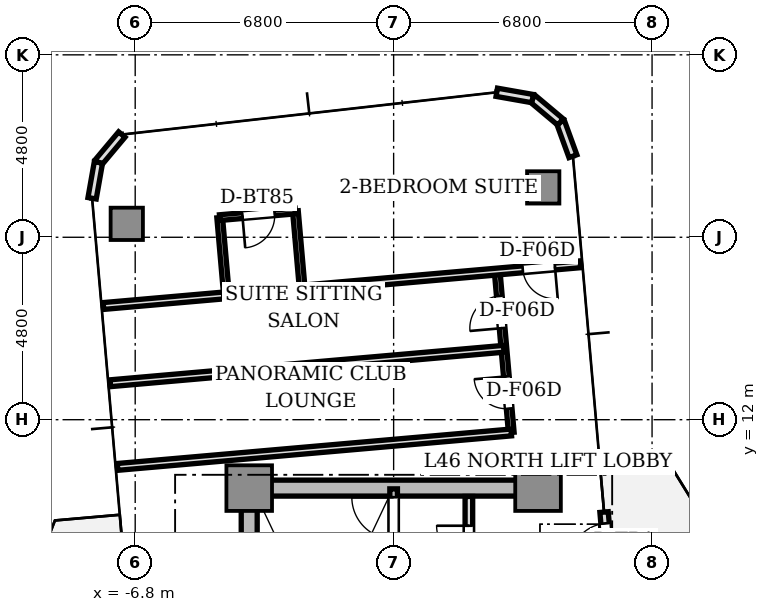
"""IFC4 building model, lengths in metres.
Left out: names, types, materials, properties, quantities, classifications, styles, units other than length and angle.
Written with IfcOpenShell. Run it as: python <this file> out.ifc"""

import sys

from ifc_helpers import new_model, si_unit, direction, frame, frame_2d, origin, origin_2d, place, context, subcontext, project, spatial, rectangle, extrude, source, transform, mapped, element, fill, save


model = new_model("IFC4")
c1 = context("Model", 3, precision=1e-05, world=origin(), true_north=direction((0.0, 1.0)))
c2 = subcontext(c1, "Body", "Model", "MODEL_VIEW")
j1 = project(units=[si_unit("LENGTHUNIT", "METRE"), si_unit("PLANEANGLEUNIT", "RADIAN")], contexts=[c1])
p1 = place(None, origin())
s1 = spatial("IfcSite", under=j1, at=p1, CompositionType="ELEMENT")
p2 = place(p1, origin())
s2 = spatial("IfcBuilding", under=s1, at=p2, CompositionType="ELEMENT")
p3 = place(p2, frame((0.0, 0.0, 167.35)))
s3 = spatial("IfcBuildingStorey", under=s2, at=p3, CompositionType="ELEMENT", Elevation=167.35)
p4 = place(p3, frame((-3.55, 10.2, 0.0), z_axis=(0.0, 0.0, 1.0), x_axis=(1.0, 0.0, 0.0)))
e1 = element("IfcWall", 1, at=p4, inside=s3, PredefinedType="SHEAR", context=c2, shape_type="SweptSolid", body=[
    extrude(rectangle(XDim=7.1, YDim=0.42, at=frame_2d((3.55, 0.0))), origin(), (0.0, 0.0, 1.0), 3.05),
])
p5 = place(p3, frame((-3.8, 2.85, 0.0), z_axis=(0.0, 0.0, 1.0), x_axis=(0.0, 1.0, 0.0)))
e2 = element("IfcWall", 2, at=p5, inside=s3, PredefinedType="SHEAR", context=c2, shape_type="SweptSolid", body=[
    extrude(rectangle(XDim=6.9, YDim=0.42, at=frame_2d((3.45, 0.0))), origin(), (0.0, 0.0, 1.0), 3.05),
])
m1 = source(origin(), c2, "Body", "SweptSolid", [
    extrude(rectangle(XDim=1.2, YDim=1.2, at=origin_2d()), origin(), (0.0, 0.0, 1.0), 3.05),
])
for number, where, z_axis, x_axis in (
    (3, (-3.8, 10.2, 0.0), (0.0, 0.0, 1.0), (1.0, 0.0, 0.0)),
    (4, (3.8, 10.2, 0.0), (0.0, 0.0, 1.0), (1.0, 0.0, 0.0)),
):
    element("IfcColumn", number, at=place(p3, frame(where, z_axis=z_axis, x_axis=x_axis)), inside=s3, PredefinedType="COLUMN", context=c2, shape_type="MappedRepresentation", body=[
        mapped(m1, transform((0.0, 0.0, 0.0), scale=1.0)),
    ])
m2 = source(origin(), c2, "Body", "SweptSolid", [
    extrude(rectangle(XDim=0.85, YDim=0.85, at=origin_2d()), origin(), (0.0, 0.0, 1.0), 3.05),
])
for number, where, z_axis, x_axis in (
    (5, (3.936, 18.112, 0.0), (0.0, 0.0, 1.0), (1.0, 0.0, 0.0)),
    (6, (-7.022, 17.153, 0.0), (0.0, 0.0, 1.0), (1.0, 0.0, 0.0)),
):
    element("IfcColumn", number, at=place(p3, frame(where, z_axis=z_axis, x_axis=x_axis)), inside=s3, PredefinedType="COLUMN", context=c2, shape_type="MappedRepresentation", body=[
        mapped(m2, transform((0.0, 0.0, 0.0), scale=1.0)),
    ])
p6 = place(p3, frame((5.772, 6.879, 0.0), z_axis=(0.0, 0.0, 1.0), x_axis=(-0.087168071984, 0.996193619346, 0.0)))
e7 = element("IfcWall", 7, at=p6, inside=s3, PredefinedType="STANDARD", context=c2, shape_type="SweptSolid", body=[
    extrude(rectangle(XDim=2.7, YDim=0.22, at=frame_2d((1.35, 0.0))), origin(), (0.0, 0.0, 1.0), 3.05),
])
p7 = place(p6, frame((1.4, 0.0, 0.0)))
e8 = element("IfcOpeningElement", 8, at=p7, cuts=e7, PredefinedType="OPENING", context=c2, shape_type="SweptSolid", body=[
    extrude(rectangle(XDim=1.0, YDim=2.2, at=frame_2d((0.5, 1.1))), frame((0.0, 0.12, 0.0), z_axis=(0.0, -1.0, 0.0), x_axis=(1.0, 0.0, 0.0)), (0.0, 0.0, 1.0), 0.24),
])
p8 = place(p3, frame((4.718, 18.933, 0.0), z_axis=(0.0, 0.0, 1.0), x_axis=(-0.34188635151, 0.939741306239, 0.0)))
e9 = element("IfcWall", 9, at=p8, inside=s3, PredefinedType="STANDARD", context=c2, shape_type="SweptSolid", body=[
    extrude(rectangle(XDim=0.958, YDim=0.22, at=frame_2d((0.479, 0.0))), origin(), (0.0, 0.0, 1.0), 3.05),
])
for number, where, z_axis, x_axis in (
    (10, (4.39, 19.833, 0.0), (0.0, 0.0, 1.0), (-0.766, 0.643, 0.0)),
    (11, (3.657, 20.449, 0.0), (0.0, 0.0, 1.0), (-0.985, 0.174, 0.0)),
):
    element("IfcWall", number, at=place(p3, frame(where, z_axis=z_axis, x_axis=x_axis)), inside=s3, PredefinedType="STANDARD", context=c2, shape_type="SweptSolid", body=[
        extrude(rectangle(XDim=0.958, YDim=0.22, at=frame_2d((0.479, 0.0))), origin(), (0.0, 0.0, 1.0), 3.05),
    ])
for number, where, z_axis, x_axis in (
    (12, (-7.152, 19.503, 0.0), (0.0, 0.0, 1.0), (-0.643, -0.766, 0.0)),
    (13, (-7.768, 18.769, 0.0), (0.0, 0.0, 1.0), (-0.174, -0.985, 0.0)),
):
    element("IfcWall", number, at=place(p3, frame(where, z_axis=z_axis, x_axis=x_axis)), inside=s3, PredefinedType="STANDARD", context=c2, shape_type="SweptSolid", body=[
        extrude(rectangle(XDim=0.958, YDim=0.22, at=frame_2d((0.479, 0.0))), origin(), (0.0, 0.0, 1.0), 3.05),
    ])
p9 = place(p3, frame((0.0, 2.5, 0.0), z_axis=(0.0, 0.0, 1.0), x_axis=(0.0, 1.0, 0.0)))
e14 = element("IfcWall", 14, at=p9, inside=s3, PredefinedType="SOLIDWALL", context=c2, shape_type="SweptSolid", body=[
    extrude(rectangle(XDim=7.68, YDim=0.2, at=frame_2d((3.84, 0.0))), origin(), (0.0, 0.0, 1.0), 3.05),
])
p10 = place(p9, frame((6.36, 0.0, 0.0)))
e15 = element("IfcOpeningElement", 15, at=p10, cuts=e14, PredefinedType="OPENING", context=c2, shape_type="SweptSolid", body=[
    extrude(rectangle(XDim=1.1, YDim=2.15, at=frame_2d((0.55, 1.075))), frame((0.0, 0.11, 0.0), z_axis=(0.0, -1.0, 0.0), x_axis=(1.0, 0.0, 0.0)), (0.0, 0.0, 1.0), 0.22),
])
p11 = place(p3, frame((1.98, 5.32, 0.0), z_axis=(0.0, 0.0, 1.0), x_axis=(0.0, 1.0, 0.0)))
e16 = element("IfcWall", 16, at=p11, inside=s3, PredefinedType="SOLIDWALL", context=c2, shape_type="SweptSolid", body=[
    extrude(rectangle(XDim=4.66, YDim=0.2, at=frame_2d((2.33, 0.0))), origin(), (0.0, 0.0, 1.0), 2.6),
])
p12 = place(p11, frame((3.04, 0.0, 0.0)))
e17 = element("IfcOpeningElement", 17, at=p12, cuts=e16, PredefinedType="OPENING", context=c2, shape_type="SweptSolid", body=[
    extrude(rectangle(XDim=0.85, YDim=2.1, at=frame_2d((0.425, 1.05))), frame((0.0, 0.11, 0.0), z_axis=(0.0, -1.0, 0.0), x_axis=(1.0, 0.0, 0.0)), (0.0, 0.0, 1.0), 0.22),
])
p13 = place(p3, frame((3.095, 11.664, 0.0), z_axis=(0.0, 0.0, 1.0), x_axis=(-0.087142722004, 0.996195837173, 0.0)))
e18 = element("IfcWall", 18, at=p13, inside=s3, PredefinedType="PARTITIONING", context=c2, shape_type="SweptSolid", body=[
    extrude(rectangle(XDim=4.25, YDim=0.15, at=frame_2d((2.125, 0.0))), origin(), (0.0, 0.0, 1.0), 2.6),
])
p14 = place(p13, frame((0.63, 0.0, 0.0)))
e19 = element("IfcOpeningElement", 19, at=p14, cuts=e18, PredefinedType="OPENING", context=c2, shape_type="SweptSolid", body=[
    extrude(rectangle(XDim=0.85, YDim=2.1, at=frame_2d((0.425, 1.05))), frame((0.0, 0.085, 0.0), z_axis=(0.0, -1.0, 0.0), x_axis=(1.0, 0.0, 0.0)), (0.0, 0.0, 1.0), 0.17),
])
p15 = place(p13, frame((2.755, 0.0, 0.0)))
e20 = element("IfcOpeningElement", 20, at=p15, cuts=e18, PredefinedType="OPENING", context=c2, shape_type="SweptSolid", body=[
    extrude(rectangle(XDim=0.85, YDim=2.1, at=frame_2d((0.425, 1.05))), frame((0.0, 0.085, 0.0), z_axis=(0.0, -1.0, 0.0), x_axis=(1.0, 0.0, 0.0)), (0.0, 0.0, 1.0), 0.17),
])
p16 = place(p3, frame((3.095, 11.664, 0.0), z_axis=(0.0, 0.0, 1.0), x_axis=(-0.996196061386, -0.087140158824, 0.0)))
e21 = element("IfcWall", 21, at=p16, inside=s3, PredefinedType="PARTITIONING", context=c2, shape_type="SweptSolid", body=[
    extrude(rectangle(XDim=10.4, YDim=0.18, at=frame_2d((5.2, 0.0))), origin(), (0.0, 0.0, 1.0), 2.6),
])
p17 = place(p3, frame((2.903, 13.866, 0.0), z_axis=(0.0, 0.0, 1.0), x_axis=(-0.996194201607, -0.087161417409, 0.0)))
e22 = element("IfcWall", 22, at=p17, inside=s3, PredefinedType="PARTITIONING", context=c2, shape_type="SweptSolid", body=[
    extrude(rectangle(XDim=10.4, YDim=0.18, at=frame_2d((5.2, 0.0))), origin(), (0.0, 0.0, 1.0), 2.6),
])
p18 = place(p3, frame((4.917, 16.09, 0.0), z_axis=(0.0, 0.0, 1.0), x_axis=(-0.996196619285, -0.087133780622, 0.0)))
e23 = element("IfcWall", 23, at=p18, inside=s3, PredefinedType="PARTITIONING", context=c2, shape_type="SweptSolid", body=[
    extrude(rectangle(XDim=12.6, YDim=0.18, at=frame_2d((6.3, 0.0))), origin(), (0.0, 0.0, 1.0), 2.6),
])
p19 = place(p18, frame((0.675, 0.0, 0.0)))
e24 = element("IfcOpeningElement", 24, at=p19, cuts=e23, PredefinedType="OPENING", context=c2, shape_type="SweptSolid", body=[
    extrude(rectangle(XDim=0.85, YDim=2.1, at=frame_2d((0.425, 1.05))), frame((0.0, 0.1, 0.0), z_axis=(0.0, -1.0, 0.0), x_axis=(1.0, 0.0, 0.0)), (0.0, 0.0, 1.0), 0.2),
])
for number, where, z_axis, x_axis in (
    (25, (-4.398, 15.275, 0.0), (0.0, 0.0, 1.0), (-0.087, 0.996, 0.0)),
    (26, (-2.406, 15.449, 0.0), (0.0, 0.0, 1.0), (-0.087, 0.996, 0.0)),
):
    element("IfcWall", number, at=place(p3, frame(where, z_axis=z_axis, x_axis=x_axis)), inside=s3, PredefinedType="PARTITIONING", context=c2, shape_type="SweptSolid", body=[
        extrude(rectangle(XDim=2.05, YDim=0.15, at=frame_2d((1.025, 0.0))), origin(), (0.0, 0.0, 1.0), 2.6),
    ])
p20 = place(p3, frame((-2.584, 17.491, 0.0), z_axis=(0.0, 0.0, 1.0), x_axis=(-0.99619464492, -0.087156350505, 0.0)))
e27 = element("IfcWall", 27, at=p20, inside=s3, PredefinedType="PARTITIONING", context=c2, shape_type="SweptSolid", body=[
    extrude(rectangle(XDim=2.0, YDim=0.15, at=frame_2d((1.0, 0.0))), origin(), (0.0, 0.0, 1.0), 2.57),
])
p21 = place(p20, frame((0.55, 0.0, 0.0)))
e28 = element("IfcOpeningElement", 28, at=p21, cuts=e27, PredefinedType="OPENING", context=c2, shape_type="SweptSolid", body=[
    extrude(rectangle(XDim=0.85, YDim=2.1, at=frame_2d((0.425, 1.05))), frame((0.0, 0.085, 0.0), z_axis=(0.0, -1.0, 0.0), x_axis=(1.0, 0.0, 0.0)), (0.0, 0.0, 1.0), 0.17),
])
m3 = source(origin(), c2, "Body", "SweptSolid", [
    extrude(rectangle(XDim=1.0, YDim=0.05, at=origin_2d()), origin(), (0.0, 0.0, 1.0), 2.2),
])
p22 = place(p7, frame((0.5, 0.0, 0.0)))
e29 = element("IfcDoor", 29, at=p22, inside=s3, OperationType="SINGLE_SWING_LEFT", PredefinedType="DOOR", context=c2, shape_type="MappedRepresentation", body=[
    mapped(m3, transform((0.0, 0.0, 0.0), scale=1.0)),
])
fill(e8, e29)
m4 = source(origin(), c2, "Body", "SweptSolid", [
    extrude(rectangle(XDim=1.1, YDim=0.05, at=origin_2d()), origin(), (0.0, 0.0, 1.0), 2.15),
])
p23 = place(p10, frame((0.55, 0.0, 0.0)))
e30 = element("IfcDoor", 30, at=p23, inside=s3, OperationType="SINGLE_SWING_RIGHT", PredefinedType="DOOR", context=c2, shape_type="MappedRepresentation", body=[
    mapped(m4, transform((0.0, 0.0, 0.0), scale=1.0)),
])
fill(e15, e30)
m5 = source(origin(), c2, "Body", "SweptSolid", [
    extrude(rectangle(XDim=0.85, YDim=0.05, at=origin_2d()), origin(), (0.0, 0.0, 1.0), 2.1),
])
p24 = place(p12, frame((0.425, 0.0, 0.0)))
e31 = element("IfcDoor", 31, at=p24, inside=s3, OperationType="SINGLE_SWING_RIGHT", PredefinedType="DOOR", context=c2, shape_type="MappedRepresentation", body=[
    mapped(m5, transform((0.0, 0.0, 0.0), scale=1.0)),
])
fill(e17, e31)
p25 = place(p14, frame((0.425, 0.0, 0.0)))
e32 = element("IfcDoor", 32, at=p25, inside=s3, OperationType="SINGLE_SWING_RIGHT", PredefinedType="DOOR", context=c2, shape_type="MappedRepresentation", body=[
    mapped(m5, transform((0.0, 0.0, 0.0), scale=1.0)),
])
fill(e19, e32)
p26 = place(p15, frame((0.425, 0.0, 0.0)))
e33 = element("IfcDoor", 33, at=p26, inside=s3, OperationType="SINGLE_SWING_LEFT", PredefinedType="DOOR", context=c2, shape_type="MappedRepresentation", body=[
    mapped(m5, transform((0.0, 0.0, 0.0), scale=1.0)),
])
fill(e20, e33)
p27 = place(p21, frame((0.425, 0.0, 0.0)))
e34 = element("IfcDoor", 34, at=p27, inside=s3, OperationType="SINGLE_SWING_RIGHT", PredefinedType="DOOR", context=c2, shape_type="MappedRepresentation", body=[
    mapped(m5, transform((0.0, 0.0, 0.0), scale=1.0)),
])
fill(e28, e34)
p28 = place(p19, frame((0.425, 0.0, 0.0)))
e35 = element("IfcDoor", 35, at=p28, inside=s3, OperationType="SINGLE_SWING_LEFT", PredefinedType="DOOR", context=c2, shape_type="MappedRepresentation", body=[
    mapped(m5, transform((0.0, 0.0, 0.0), scale=1.0)),
])
fill(e24, e35)
save(model, sys.argv[1])
